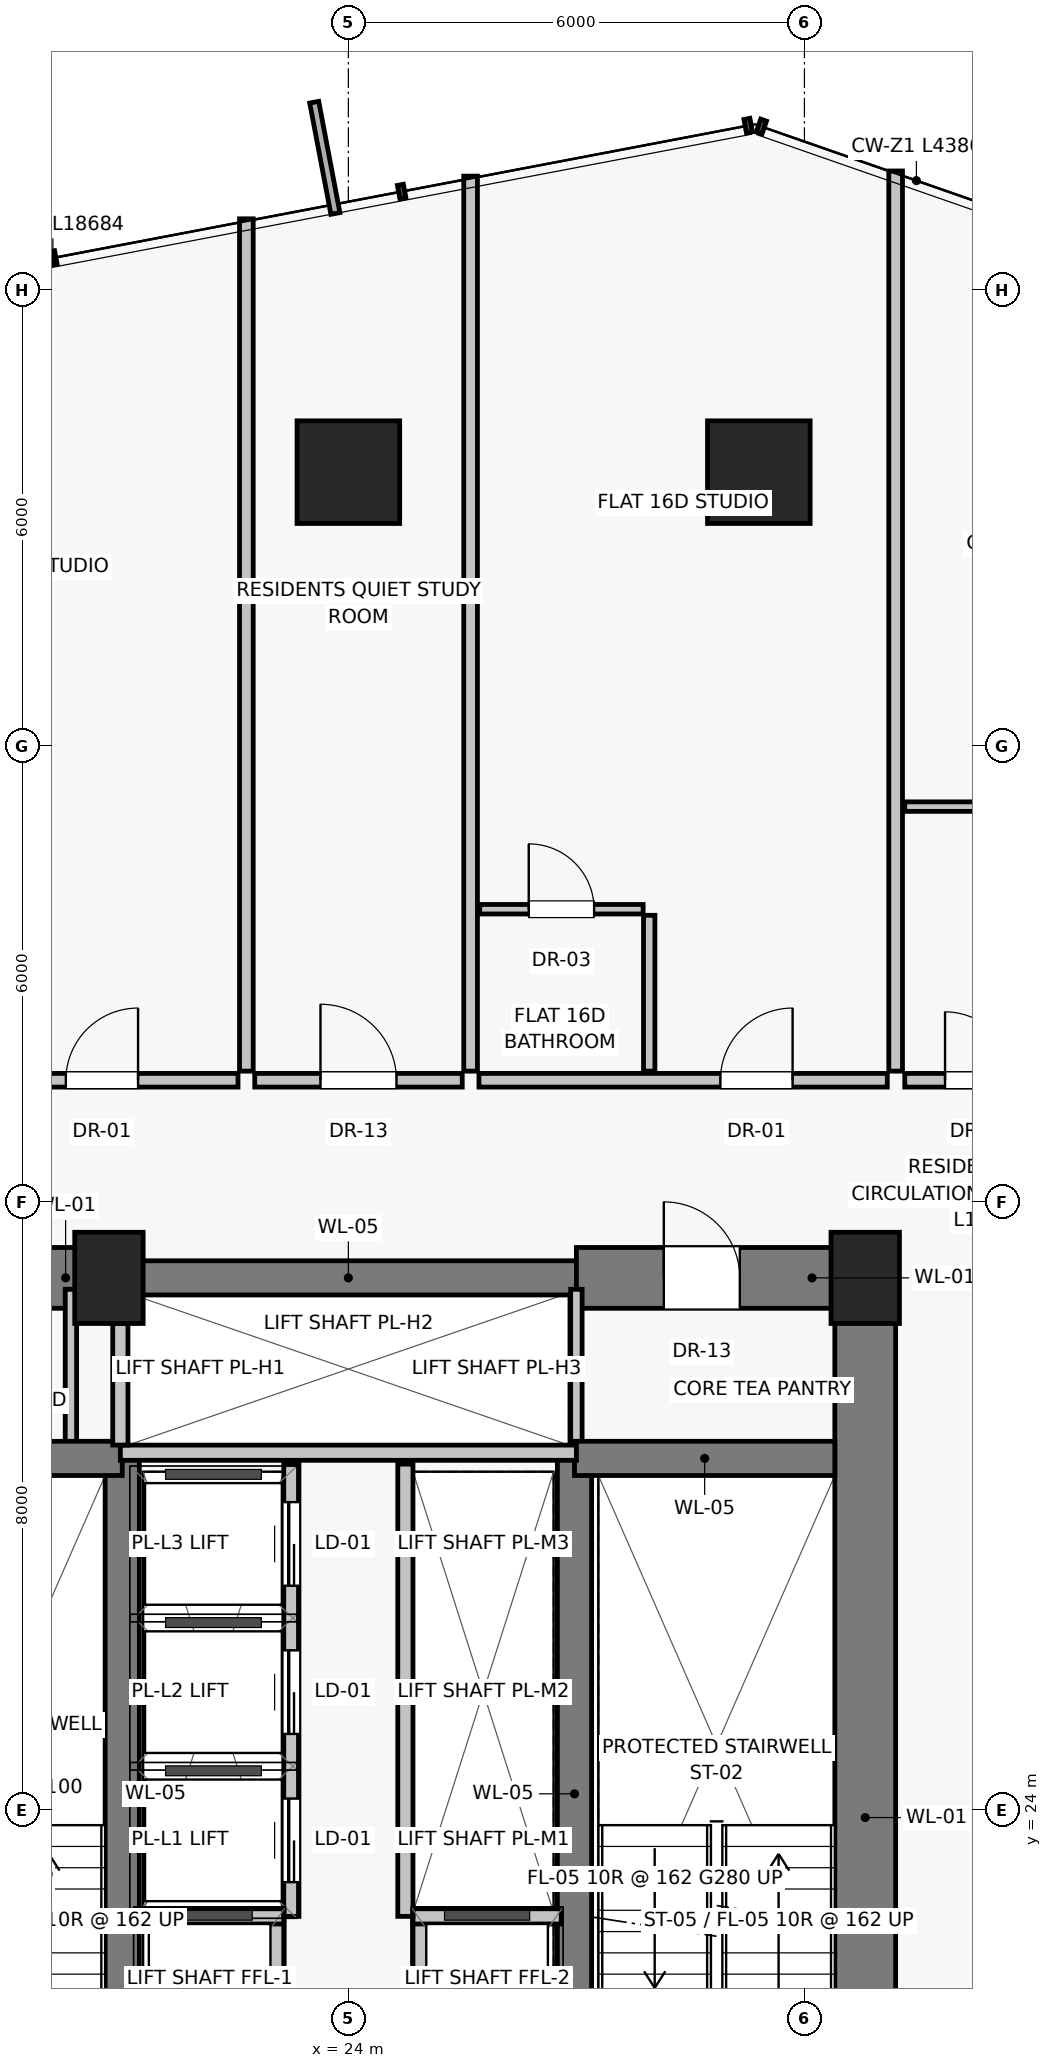
"""IFC4 building model, lengths in metres.
Left out: names, types, materials, properties, quantities, classifications, styles, units other than length and angle.
Written with IfcOpenShell. Run it as: python <this file> out.ifc"""

import sys

from ifc_helpers import new_model, si_unit, direction, frame, frame_2d, origin, origin_2d, place, context, subcontext, project, spatial, rectangle, extrude, source, transform, mapped, element, fill, save


model = new_model("IFC4")
c1 = context("Model", 3, precision=1e-05, world=origin(), true_north=direction((0.0, 1.0)))
c2 = subcontext(c1, "Body", "Model", "MODEL_VIEW")
j1 = project(units=[si_unit("LENGTHUNIT", "METRE"), si_unit("PLANEANGLEUNIT", "RADIAN")], contexts=[c1])
p1 = place(None, origin())
s1 = spatial("IfcSite", under=j1, at=p1, CompositionType="ELEMENT")
p2 = place(p1, origin())
s2 = spatial("IfcBuilding", under=s1, at=p2, CompositionType="ELEMENT")
p3 = place(p2, frame((0.0, 0.0, 60.85)))
s3 = spatial("IfcBuildingStorey", under=s2, at=p3, CompositionType="ELEMENT", Elevation=60.85)
for number, where, z_axis, x_axis in (
    (1, (20.85, 31.0, 0.0), (0.0, 0.0, 1.0), (1.0, 0.0, 0.0)),
    (2, (30.8, 31.0, 0.0), (0.0, 0.0, 1.0), (1.0, 0.0, 0.0)),
):
    element("IfcColumn", number, at=place(p3, frame(where, z_axis=z_axis, x_axis=x_axis)), inside=s3, PredefinedType="PILASTER", context=c2, shape_type="SweptSolid", body=[
        extrude(rectangle(XDim=0.9, YDim=1.2, at=origin_2d()), origin(), (0.0, 0.0, 1.0), 3.25),
    ])
for number, where, z_axis, x_axis in (
    (3, (29.4, 41.6, 0.0), (0.0, 0.0, 1.0), (1.0, 0.0, 0.0)),
    (4, (24.0, 41.6, 0.0), (0.0, 0.0, 1.0), (1.0, 0.0, 0.0)),
):
    element("IfcColumn", number, at=place(p3, frame(where, z_axis=z_axis, x_axis=x_axis)), inside=s3, PredefinedType="COLUMN", context=c2, shape_type="SweptSolid", body=[
        extrude(rectangle(XDim=1.35, YDim=1.35, at=origin_2d()), origin(), (0.0, 0.0, 1.0), 3.25),
    ])
p4 = place(p3, frame((30.8, 16.8, 0.0), z_axis=(0.0, 0.0, 1.0), x_axis=(0.0, 1.0, 0.0)))
e5 = element("IfcWall", 5, at=p4, inside=s3, PredefinedType="SHEAR", context=c2, shape_type="SweptSolid", body=[
    extrude(rectangle(XDim=14.2, YDim=0.8, at=frame_2d((7.1, 0.0))), origin(), (0.0, 0.0, 1.0), 3.0),
])
p5 = place(p3, frame((17.2, 31.0, 0.0), z_axis=(0.0, 0.0, 1.0), x_axis=(1.0, 0.0, 0.0)))
e6 = element("IfcWall", 6, at=p5, inside=s3, PredefinedType="SHEAR", context=c2, shape_type="SweptSolid", body=[
    extrude(rectangle(XDim=3.8, YDim=0.8, at=frame_2d((1.9, 0.0))), origin(), (0.0, 0.0, 1.0), 3.0),
])
p6 = place(p5, frame((1.25, 0.0, 0.0)))
e7 = element("IfcOpeningElement", 7, at=p6, cuts=e6, PredefinedType="OPENING", context=c2, shape_type="SweptSolid", body=[
    extrude(rectangle(XDim=0.86, YDim=2.01, at=frame_2d((0.43, 1.005))), frame((0.0, 0.41, 0.0), z_axis=(0.0, -1.0, 0.0), x_axis=(1.0, 0.0, 0.0)), (0.0, 0.0, 1.0), 0.82),
])
p7 = place(p3, frame((21.0, 31.0, 0.0), z_axis=(0.0, 0.0, 1.0), x_axis=(1.0, 0.0, 0.0)))
e8 = element("IfcWall", 8, at=p7, inside=s3, PredefinedType="SHEAR", context=c2, shape_type="SweptSolid", body=[
    extrude(rectangle(XDim=6.0, YDim=0.45, at=frame_2d((3.0, 0.0))), origin(), (0.0, 0.0, 1.0), 3.0),
])
p8 = place(p3, frame((27.0, 31.0, 0.0), z_axis=(0.0, 0.0, 1.0), x_axis=(1.0, 0.0, 0.0)))
e9 = element("IfcWall", 9, at=p8, inside=s3, PredefinedType="SHEAR", context=c2, shape_type="SweptSolid", body=[
    extrude(rectangle(XDim=3.8, YDim=0.8, at=frame_2d((1.9, 0.0))), origin(), (0.0, 0.0, 1.0), 3.0),
])
p9 = place(p8, frame((1.15, 0.0, 0.0)))
e10 = element("IfcOpeningElement", 10, at=p9, cuts=e9, PredefinedType="OPENING", context=c2, shape_type="SweptSolid", body=[
    extrude(rectangle(XDim=1.0, YDim=2.01, at=frame_2d((0.5, 1.005))), frame((0.0, 0.41, 0.0), z_axis=(0.0, -1.0, 0.0), x_axis=(1.0, 0.0, 0.0)), (0.0, 0.0, 1.0), 0.82),
])
for number, where, z_axis, x_axis in (
    (11, (20.35, 28.65, 0.0), (0.0, 0.0, 1.0), (0.0, 1.0, 0.0)),
    (12, (27.0, 28.65, 0.0), (0.0, 0.0, 1.0), (0.0, 1.0, 0.0)),
):
    element("IfcWall", number, at=place(p3, frame(where, z_axis=z_axis, x_axis=x_axis)), inside=s3, PredefinedType="PARTITIONING", context=c2, shape_type="SweptSolid", body=[
        extrude(rectangle(XDim=2.2, YDim=0.15, at=frame_2d((1.1, 0.0))), origin(), (0.0, 0.0, 1.0), 3.0),
    ])
for number, where, z_axis, x_axis in (
    (13, (21.025, 19.8, 0.0), (0.0, 0.0, 1.0), (0.0, 1.0, 0.0)),
    (14, (26.975, 19.8, 0.0), (0.0, 0.0, 1.0), (0.0, 1.0, 0.0)),
):
    element("IfcWall", number, at=place(p3, frame(where, z_axis=z_axis, x_axis=x_axis)), inside=s3, PredefinedType="SHEAR", context=c2, shape_type="SweptSolid", body=[
        extrude(rectangle(XDim=8.825, YDim=0.45, at=frame_2d((4.413, 0.0))), origin(), (0.0, 0.0, 1.0), 3.0),
    ])
for number, where, z_axis, x_axis in (
    (15, (17.6, 28.625, 0.0), (0.0, 0.0, 1.0), (1.0, 0.0, 0.0)),
    (16, (26.975, 28.625, 0.0), (0.0, 0.0, 1.0), (1.0, 0.0, 0.0)),
):
    element("IfcWall", number, at=place(p3, frame(where, z_axis=z_axis, x_axis=x_axis)), inside=s3, PredefinedType="SHEAR", context=c2, shape_type="SweptSolid", body=[
        extrude(rectangle(XDim=3.425, YDim=0.45, at=frame_2d((1.712, 0.0))), origin(), (0.0, 0.0, 1.0), 3.0),
    ])
for number, where, z_axis, x_axis in (
    (17, (23.05, 16.95, 0.0), (0.0, 0.0, 1.0), (0.0, 1.0, 0.0)),
    (18, (24.95, 16.95, 0.0), (0.0, 0.0, 1.0), (0.0, 1.0, 0.0)),
):
    element("IfcWall", number, at=place(p3, frame(where, z_axis=z_axis, x_axis=x_axis)), inside=s3, PredefinedType="SOLIDWALL", context=c2, shape_type="SweptSolid", body=[
        extrude(rectangle(XDim=5.6, YDim=0.2, at=frame_2d((2.8, 0.0))), origin(), (0.0, 0.0, 1.0), 3.0),
    ])
for number, where, z_axis, x_axis in (
    (19, (21.2, 22.6, 0.0), (0.0, 0.0, 1.0), (1.0, 0.0, 0.0)),
    (20, (24.85, 22.6, 0.0), (0.0, 0.0, 1.0), (1.0, 0.0, 0.0)),
):
    element("IfcWall", number, at=place(p3, frame(where, z_axis=z_axis, x_axis=x_axis)), inside=s3, PredefinedType="SOLIDWALL", context=c2, shape_type="SweptSolid", body=[
        extrude(rectangle(XDim=1.95, YDim=0.2, at=frame_2d((0.975, 0.0))), origin(), (0.0, 0.0, 1.0), 3.0),
    ])
p10 = place(p3, frame((21.0, 28.7, 0.0), z_axis=(0.0, 0.0, 1.0), x_axis=(1.0, 0.0, 0.0)))
e21 = element("IfcWall", 21, at=p10, inside=s3, PredefinedType="SOLIDWALL", context=c2, shape_type="SweptSolid", body=[
    extrude(rectangle(XDim=6.0, YDim=0.2, at=frame_2d((3.0, 0.0))), origin(), (0.0, 0.0, 1.0), 3.0),
])
p11 = place(p3, frame((21.0, 28.8, 0.0), z_axis=(0.0, 0.0, 1.0), x_axis=(0.0, 1.0, 0.0)))
e22 = element("IfcWall", 22, at=p11, inside=s3, PredefinedType="SOLIDWALL", context=c2, shape_type="SweptSolid", body=[
    extrude(rectangle(XDim=1.6, YDim=0.2, at=frame_2d((0.8, 0.0))), origin(), (0.0, 0.0, 1.0), 3.0),
])
p12 = place(p3, frame((23.25, 22.6, 0.0), z_axis=(0.0, 0.0, 1.0), x_axis=(0.0, 1.0, 0.0)))
e23 = element("IfcWall", 23, at=p12, inside=s3, PredefinedType="SOLIDWALL", context=c2, shape_type="SweptSolid", body=[
    extrude(rectangle(XDim=5.95, YDim=0.2, at=frame_2d((2.975, 0.0))), origin(), (0.0, 0.0, 1.0), 3.0),
])
p13 = place(p12, frame((0.45, 0.0, 0.0)))
e24 = element("IfcOpeningElement", 24, at=p13, cuts=e23, PredefinedType="OPENING", context=c2, shape_type="SweptSolid", body=[
    extrude(rectangle(XDim=1.1, YDim=2.08, at=frame_2d((0.55, 1.04))), frame((0.0, 0.11, 0.0), z_axis=(0.0, -1.0, 0.0), x_axis=(1.0, 0.0, 0.0)), (0.0, 0.0, 1.0), 0.22),
])
p14 = place(p12, frame((2.4, 0.0, 0.0)))
e25 = element("IfcOpeningElement", 25, at=p14, cuts=e23, PredefinedType="OPENING", context=c2, shape_type="SweptSolid", body=[
    extrude(rectangle(XDim=1.1, YDim=2.08, at=frame_2d((0.55, 1.04))), frame((0.0, 0.11, 0.0), z_axis=(0.0, -1.0, 0.0), x_axis=(1.0, 0.0, 0.0)), (0.0, 0.0, 1.0), 0.22),
])
p15 = place(p12, frame((4.35, 0.0, 0.0)))
e26 = element("IfcOpeningElement", 26, at=p15, cuts=e23, PredefinedType="OPENING", context=c2, shape_type="SweptSolid", body=[
    extrude(rectangle(XDim=1.1, YDim=2.08, at=frame_2d((0.55, 1.04))), frame((0.0, 0.11, 0.0), z_axis=(0.0, -1.0, 0.0), x_axis=(1.0, 0.0, 0.0)), (0.0, 0.0, 1.0), 0.22),
])
p16 = place(p3, frame((24.75, 22.6, 0.0), z_axis=(0.0, 0.0, 1.0), x_axis=(0.0, 1.0, 0.0)))
e27 = element("IfcWall", 27, at=p16, inside=s3, PredefinedType="SOLIDWALL", context=c2, shape_type="SweptSolid", body=[
    extrude(rectangle(XDim=5.95, YDim=0.2, at=frame_2d((2.975, 0.0))), origin(), (0.0, 0.0, 1.0), 3.0),
])
p17 = place(p3, frame((31.2, 33.72, 0.0), z_axis=(0.0, 0.0, 1.0), x_axis=(0.0, 1.0, 0.0)))
e28 = element("IfcWall", 28, at=p17, inside=s3, PredefinedType="PARTITIONING", context=c2, shape_type="SweptSolid", body=[
    extrude(rectangle(XDim=11.843, YDim=0.18, at=frame_2d((5.921, 0.0))), origin(), (0.0, 0.0, 1.0), 3.0),
])
p18 = place(p3, frame((22.768, 33.6, 0.0), z_axis=(0.0, 0.0, 1.0), x_axis=(1.0, 0.0, 0.0)))
e29 = element("IfcWall", 29, at=p18, inside=s3, PredefinedType="PARTITIONING", context=c2, shape_type="SweptSolid", body=[
    extrude(rectangle(XDim=2.73, YDim=0.18, at=frame_2d((1.365, 0.0))), origin(), (0.0, 0.0, 1.0), 3.0),
])
p19 = place(p18, frame((0.865, 0.0, 0.0)))
e30 = element("IfcOpeningElement", 30, at=p19, cuts=e29, PredefinedType="OPENING", context=c2, shape_type="SweptSolid", body=[
    extrude(rectangle(XDim=1.0, YDim=2.01, at=frame_2d((0.5, 1.005))), frame((0.0, 0.1, 0.0), z_axis=(0.0, -1.0, 0.0), x_axis=(1.0, 0.0, 0.0)), (0.0, 0.0, 1.0), 0.2),
])
p20 = place(p3, frame((22.658, 33.72, 0.0), z_axis=(0.0, 0.0, 1.0), x_axis=(0.0, 1.0, 0.0)))
e31 = element("IfcWall", 31, at=p20, inside=s3, PredefinedType="PARTITIONING", context=c2, shape_type="SweptSolid", body=[
    extrude(rectangle(XDim=11.213, YDim=0.18, at=frame_2d((5.606, 0.0))), origin(), (0.0, 0.0, 1.0), 3.0),
])
p21 = place(p3, frame((16.91, 33.6, 0.0), z_axis=(0.0, 0.0, 1.0), x_axis=(1.0, 0.0, 0.0)))
e32 = element("IfcWall", 32, at=p21, inside=s3, PredefinedType="PARTITIONING", context=c2, shape_type="SweptSolid", body=[
    extrude(rectangle(XDim=5.638, YDim=0.18, at=frame_2d((2.819, 0.0))), origin(), (0.0, 0.0, 1.0), 3.0),
])
p22 = place(p21, frame((3.373, 0.0, 0.0)))
e33 = element("IfcOpeningElement", 33, at=p22, cuts=e32, PredefinedType="OPENING", context=c2, shape_type="SweptSolid", body=[
    extrude(rectangle(XDim=0.95, YDim=2.02, at=frame_2d((0.475, 1.01))), frame((0.0, 0.1, 0.0), z_axis=(0.0, -1.0, 0.0), x_axis=(1.0, 0.0, 0.0)), (0.0, 0.0, 1.0), 0.2),
])
p23 = place(p3, frame((25.608, 33.72, 0.0), z_axis=(0.0, 0.0, 1.0), x_axis=(0.0, 1.0, 0.0)))
e34 = element("IfcWall", 34, at=p23, inside=s3, PredefinedType="PARTITIONING", context=c2, shape_type="SweptSolid", body=[
    extrude(rectangle(XDim=11.775, YDim=0.18, at=frame_2d((5.887, 0.0))), origin(), (0.0, 0.0, 1.0), 3.0),
])
p24 = place(p3, frame((25.718, 33.6, 0.0), z_axis=(0.0, 0.0, 1.0), x_axis=(1.0, 0.0, 0.0)))
e35 = element("IfcWall", 35, at=p24, inside=s3, PredefinedType="PARTITIONING", context=c2, shape_type="SweptSolid", body=[
    extrude(rectangle(XDim=5.372, YDim=0.18, at=frame_2d((2.686, 0.0))), origin(), (0.0, 0.0, 1.0), 3.0),
])
p25 = place(p24, frame((3.176, 0.0, 0.0)))
e36 = element("IfcOpeningElement", 36, at=p25, cuts=e35, PredefinedType="OPENING", context=c2, shape_type="SweptSolid", body=[
    extrude(rectangle(XDim=0.95, YDim=2.02, at=frame_2d((0.475, 1.01))), frame((0.0, 0.1, 0.0), z_axis=(0.0, -1.0, 0.0), x_axis=(1.0, 0.0, 0.0)), (0.0, 0.0, 1.0), 0.2),
])
p26 = place(p3, frame((27.958, 33.72, 0.0), z_axis=(0.0, 0.0, 1.0), x_axis=(0.0, 1.0, 0.0)))
e37 = element("IfcWall", 37, at=p26, inside=s3, PredefinedType="PARTITIONING", context=c2, shape_type="SweptSolid", body=[
    extrude(rectangle(XDim=2.05, YDim=0.15, at=frame_2d((1.025, 0.0))), origin(), (0.0, 0.0, 1.0), 3.0),
])
p27 = place(p3, frame((25.728, 35.85, 0.0), z_axis=(0.0, 0.0, 1.0), x_axis=(1.0, 0.0, 0.0)))
e38 = element("IfcWall", 38, at=p27, inside=s3, PredefinedType="PARTITIONING", context=c2, shape_type="SweptSolid", body=[
    extrude(rectangle(XDim=2.15, YDim=0.125, at=frame_2d((1.075, 0.0))), origin(), (0.0, 0.0, 1.0), 3.0),
])
p28 = place(p27, frame((0.645, 0.0, 0.0)))
e39 = element("IfcOpeningElement", 39, at=p28, cuts=e38, PredefinedType="OPENING", context=c2, shape_type="SweptSolid", body=[
    extrude(rectangle(XDim=0.86, YDim=2.01, at=frame_2d((0.43, 1.005))), frame((0.0, 0.073, 0.0), z_axis=(0.0, -1.0, 0.0), x_axis=(1.0, 0.0, 0.0)), (0.0, 0.0, 1.0), 0.145),
])
p29 = place(p3, frame((31.32, 33.6, 0.0), z_axis=(0.0, 0.0, 1.0), x_axis=(1.0, 0.0, 0.0)))
e40 = element("IfcWall", 40, at=p29, inside=s3, PredefinedType="PARTITIONING", context=c2, shape_type="SweptSolid", body=[
    extrude(rectangle(XDim=1.96, YDim=0.18, at=frame_2d((0.98, 0.0))), origin(), (0.0, 0.0, 1.0), 3.0),
])
p30 = place(p29, frame((0.53, 0.0, 0.0)))
e41 = element("IfcOpeningElement", 41, at=p30, cuts=e40, PredefinedType="OPENING", context=c2, shape_type="SweptSolid", body=[
    extrude(rectangle(XDim=0.9, YDim=2.01, at=frame_2d((0.45, 1.005))), frame((0.0, 0.1, 0.0), z_axis=(0.0, -1.0, 0.0), x_axis=(1.0, 0.0, 0.0)), (0.0, 0.0, 1.0), 0.2),
])
p31 = place(p3, frame((31.32, 37.2, 0.0), z_axis=(0.0, 0.0, 1.0), x_axis=(1.0, 0.0, 0.0)))
e42 = element("IfcWall", 42, at=p31, inside=s3, PredefinedType="PARTITIONING", context=c2, shape_type="SweptSolid", body=[
    extrude(rectangle(XDim=8.782, YDim=0.125, at=frame_2d((4.391, 0.0))), origin(), (0.0, 0.0, 1.0), 3.0),
])
p32 = place(p31, frame((3.941, 0.0, 0.0)))
e43 = element("IfcOpeningElement", 43, at=p32, cuts=e42, PredefinedType="OPENING", context=c2, shape_type="SweptSolid", body=[
    extrude(rectangle(XDim=0.9, YDim=2.01, at=frame_2d((0.45, 1.005))), frame((0.0, 0.073, 0.0), z_axis=(0.0, -1.0, 0.0), x_axis=(1.0, 0.0, 0.0)), (0.0, 0.0, 1.0), 0.145),
])
m1 = source(origin(), c2, "Body", "SweptSolid", [
    extrude(rectangle(XDim=1.0, YDim=2.01, at=frame_2d((0.5, 1.005))), frame((0.0, 0.025, 0.0), z_axis=(0.0, -1.0, 0.0), x_axis=(1.0, 0.0, 0.0)), (0.0, 0.0, 1.0), 0.05),
])
p33 = place(p9, origin())
e44 = element("IfcDoor", 44, at=p33, inside=s3, OperationType="SINGLE_SWING_LEFT", PredefinedType="DOOR", context=c2, shape_type="MappedRepresentation", body=[
    mapped(m1, transform((0.0, 0.0, 0.0), scale=1.0)),
])
fill(e10, e44)
m2 = source(origin(), c2, "Body", "SweptSolid", [
    extrude(rectangle(XDim=1.1, YDim=2.08, at=frame_2d((0.55, 1.04))), frame((0.0, 0.025, 0.0), z_axis=(0.0, -1.0, 0.0), x_axis=(1.0, 0.0, 0.0)), (0.0, 0.0, 1.0), 0.05),
])
p34 = place(p13, origin())
e45 = element("IfcDoor", 45, at=p34, inside=s3, OperationType="SLIDING_TO_LEFT", PredefinedType="DOOR", context=c2, shape_type="MappedRepresentation", body=[
    mapped(m2, transform((0.0, 0.0, 0.0), scale=1.0)),
])
fill(e24, e45)
p35 = place(p14, origin())
e46 = element("IfcDoor", 46, at=p35, inside=s3, OperationType="SLIDING_TO_LEFT", PredefinedType="DOOR", context=c2, shape_type="MappedRepresentation", body=[
    mapped(m2, transform((0.0, 0.0, 0.0), scale=1.0)),
])
fill(e25, e46)
p36 = place(p15, origin())
e47 = element("IfcDoor", 47, at=p36, inside=s3, OperationType="SLIDING_TO_LEFT", PredefinedType="DOOR", context=c2, shape_type="MappedRepresentation", body=[
    mapped(m2, transform((0.0, 0.0, 0.0), scale=1.0)),
])
fill(e26, e47)
p37 = place(p19, origin())
e48 = element("IfcDoor", 48, at=p37, inside=s3, OperationType="SINGLE_SWING_LEFT", PredefinedType="DOOR", context=c2, shape_type="MappedRepresentation", body=[
    mapped(m1, transform((0.0, 0.0, 0.0), scale=1.0)),
])
fill(e30, e48)
m3 = source(origin(), c2, "Body", "SweptSolid", [
    extrude(rectangle(XDim=0.95, YDim=2.02, at=frame_2d((0.475, 1.01))), frame((0.0, 0.025, 0.0), z_axis=(0.0, -1.0, 0.0), x_axis=(1.0, 0.0, 0.0)), (0.0, 0.0, 1.0), 0.05),
])
p38 = place(p22, origin())
e49 = element("IfcDoor", 49, at=p38, inside=s3, OperationType="SINGLE_SWING_RIGHT", PredefinedType="DOOR", context=c2, shape_type="MappedRepresentation", body=[
    mapped(m3, transform((0.0, 0.0, 0.0), scale=1.0)),
])
fill(e33, e49)
p39 = place(p25, origin())
e50 = element("IfcDoor", 50, at=p39, inside=s3, OperationType="SINGLE_SWING_RIGHT", PredefinedType="DOOR", context=c2, shape_type="MappedRepresentation", body=[
    mapped(m3, transform((0.0, 0.0, 0.0), scale=1.0)),
])
fill(e36, e50)
m4 = source(origin(), c2, "Body", "SweptSolid", [
    extrude(rectangle(XDim=0.86, YDim=2.01, at=frame_2d((0.43, 1.005))), frame((0.0, 0.025, 0.0), z_axis=(0.0, -1.0, 0.0), x_axis=(1.0, 0.0, 0.0)), (0.0, 0.0, 1.0), 0.05),
])
p40 = place(p28, origin())
e51 = element("IfcDoor", 51, at=p40, inside=s3, OperationType="SINGLE_SWING_LEFT", PredefinedType="DOOR", context=c2, shape_type="MappedRepresentation", body=[
    mapped(m4, transform((0.0, 0.0, 0.0), scale=1.0)),
])
fill(e39, e51)
m5 = source(origin(), c2, "Body", "SweptSolid", [
    extrude(rectangle(XDim=0.9, YDim=2.01, at=frame_2d((0.45, 1.005))), frame((0.0, 0.025, 0.0), z_axis=(0.0, -1.0, 0.0), x_axis=(1.0, 0.0, 0.0)), (0.0, 0.0, 1.0), 0.05),
])
p41 = place(p30, origin())
e52 = element("IfcDoor", 52, at=p41, inside=s3, OperationType="SINGLE_SWING_LEFT", PredefinedType="DOOR", context=c2, shape_type="MappedRepresentation", body=[
    mapped(m5, transform((0.0, 0.0, 0.0), scale=1.0)),
])
fill(e41, e52)
save(model, sys.argv[1])
